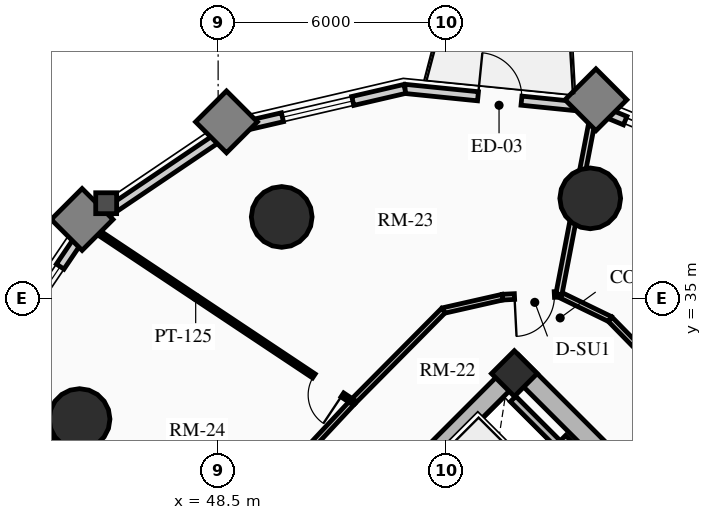
"""IFC4 building model, lengths in metres.
Left out: names, types, materials, properties, quantities, classifications, styles, units other than length and angle.
Written with IfcOpenShell. Run it as: python <this file> out.ifc"""

import sys

from ifc_helpers import new_model, si_unit, direction, frame, frame_2d, origin, origin_2d, place, context, subcontext, project, spatial, rectangle, circle, extrude, source, transform, mapped, element, fill, save


model = new_model("IFC4")
c1 = context("Model", 3, precision=1e-05, world=origin(), true_north=direction((0.0, 1.0)))
c2 = subcontext(c1, "Body", "Model", "MODEL_VIEW")
j1 = project(units=[si_unit("LENGTHUNIT", "METRE"), si_unit("PLANEANGLEUNIT", "RADIAN")], contexts=[c1])
p1 = place(None, origin())
s1 = spatial("IfcSite", under=j1, at=p1, CompositionType="ELEMENT")
p2 = place(p1, origin())
s2 = spatial("IfcBuilding", under=s1, at=p2, CompositionType="ELEMENT")
p3 = place(p2, frame((0.0, 0.0, 22.0)))
s3 = spatial("IfcBuildingStorey", under=s2, at=p3, CompositionType="ELEMENT", Elevation=22.0)
p4 = place(p3, frame((66.339, 23.227, 0.0), z_axis=(0.0, 0.0, 1.0), x_axis=(-0.707106781187, 0.707106781187, 0.0)))
e1 = element("IfcWall", 1, at=p4, inside=s3, PredefinedType="SHEAR", context=c2, shape_type="SweptSolid", body=[
    extrude(rectangle(XDim=14.3, YDim=0.5, at=frame_2d((7.15, 0.0))), origin(), (0.0, 0.0, 1.0), 2.91),
])
p5 = place(p3, frame((48.838, 25.596, 0.0), z_axis=(0.0, 0.0, 1.0), x_axis=(0.707106781187, 0.707106781187, 0.0)))
e2 = element("IfcWall", 2, at=p5, inside=s3, PredefinedType="SHEAR", context=c2, shape_type="SweptSolid", body=[
    extrude(rectangle(XDim=10.7, YDim=0.5, at=frame_2d((5.35, 0.0))), origin(), (0.0, 0.0, 1.0), 2.91),
])
m1 = source(origin(), c2, "Body", "SweptSolid", [
    extrude(rectangle(XDim=1.5, YDim=2.02, at=frame_2d((0.75, 1.01))), frame((0.0, 0.26, 0.0), z_axis=(0.0, -1.0, 0.0), x_axis=(1.0, 0.0, 0.0)), (0.0, 0.0, 1.0), 0.52),
])
p6 = place(p5, frame((4.6, 0.0, 0.0)))
e3 = element("IfcOpeningElement", 3, at=p6, cuts=e2, PredefinedType="OPENING", context=c2, shape_type="MappedRepresentation", body=[
    mapped(m1, transform((0.0, 0.0, 0.0), x_axis=(1.0, 0.0, 0.0), y_axis=(0.0, 1.0, 0.0), z_axis=(0.0, 0.0, 1.0), scale=1.0)),
])
p7 = place(p3, frame((56.294, 33.024, 0.0), z_axis=(0.0, 0.0, 1.0), x_axis=(0.707106781187, 0.707106781187, 0.0)))
e4 = element("IfcColumn", 4, at=p7, inside=s3, PredefinedType="COLUMN", context=c2, shape_type="SweptSolid", body=[
    extrude(rectangle(XDim=0.85, YDim=0.85, at=origin_2d()), origin(), (0.0, 0.0, 1.0), 2.91),
])
for number, where, z_axis, x_axis in (
    (5, (58.291, 37.635, 0.0), (0.0, 0.0, 1.0), (1.0, 0.0, 0.0)),
    (6, (50.173, 37.146, 0.0), (0.0, 0.0, 1.0), (1.0, 0.0, 0.0)),
    (7, (44.854, 31.827, 0.0), (0.0, 0.0, 1.0), (1.0, 0.0, 0.0)),
):
    element("IfcColumn", number, at=place(p3, frame(where, z_axis=z_axis, x_axis=x_axis)), inside=s3, PredefinedType="USERDEFINED", context=c2, shape_type="SweptSolid", body=[
        extrude(circle(Radius=0.8, at=origin_2d()), origin(), (0.0, 0.0, 1.0), 2.91),
    ])
p8 = place(p3, frame((58.407, 40.012, 0.0), z_axis=(0.0, 0.0, 1.0), x_axis=(0.924556017656, -0.381046152345, 0.0)))
e8 = element("IfcWall", 8, at=p8, inside=s3, PredefinedType="SOLIDWALL", context=c2, shape_type="SweptSolid", body=[
    extrude(rectangle(XDim=0.87, YDim=0.24, at=frame_2d((0.435, 0.0))), origin(), (0.0, 0.0, 1.0), 2.073),
])
p9 = place(p3, frame((53.414, 40.516, 0.0), z_axis=(0.0, 0.0, 1.0), x_axis=(0.994951574538, -0.100356187272, 0.0)))
e9 = element("IfcWall", 9, at=p9, inside=s3, PredefinedType="SOLIDWALL", context=c2, shape_type="SweptSolid", body=[
    extrude(rectangle(XDim=5.019, YDim=0.24, at=frame_2d((2.509, 0.0))), origin(), (0.0, 0.0, 1.0), 2.073),
])
m2 = source(origin(), c2, "Body", "SweptSolid", [
    extrude(rectangle(XDim=1.15, YDim=2.005, at=frame_2d((0.575, 1.002))), frame((0.0, 0.13, 0.0), z_axis=(0.0, -1.0, 0.0), x_axis=(1.0, 0.0, 0.0)), (0.0, 0.0, 1.0), 0.26),
])
p10 = place(p9, frame((1.934, 0.0, 0.0)))
e10 = element("IfcOpeningElement", 10, at=p10, cuts=e9, PredefinedType="OPENING", context=c2, shape_type="MappedRepresentation", body=[
    mapped(m2, transform((0.0, 0.0, 0.0), x_axis=(1.0, 0.0, 0.0), y_axis=(0.0, 1.0, 0.0), z_axis=(0.0, 0.0, 1.0), scale=1.0)),
])
p11 = place(p3, frame((48.82, 39.452, 0.0), z_axis=(0.0, 0.0, 1.0), x_axis=(0.974197104074, 0.225698919833, 0.0)))
e11 = element("IfcWall", 11, at=p11, inside=s3, PredefinedType="SOLIDWALL", context=c2, shape_type="SweptSolid", body=[
    extrude(rectangle(XDim=4.715, YDim=0.24, at=frame_2d((2.357, 0.0))), origin(), (0.0, 0.0, 1.0), 2.073),
])
m3 = source(origin(), c2, "Body", "SweptSolid", [
    extrude(rectangle(XDim=1.9, YDim=1.35, at=frame_2d((0.95, 0.675))), frame((0.0, 0.13, 0.0), z_axis=(0.0, -1.0, 0.0), x_axis=(1.0, 0.0, 0.0)), (0.0, 0.0, 1.0), 0.26),
])
p12 = place(p11, frame((1.408, 0.0, 0.65)))
e12 = element("IfcOpeningElement", 12, at=p12, cuts=e11, PredefinedType="OPENING", context=c2, shape_type="MappedRepresentation", body=[
    mapped(m3, transform((0.0, 0.0, 0.0), x_axis=(1.0, 0.0, 0.0), y_axis=(0.0, 1.0, 0.0), z_axis=(0.0, 0.0, 1.0), scale=1.0)),
])
p13 = place(p3, frame((45.076, 36.924, 0.0), z_axis=(0.0, 0.0, 1.0), x_axis=(0.828776615238, 0.559579594012, 0.0)))
e13 = element("IfcWall", 13, at=p13, inside=s3, PredefinedType="SOLIDWALL", context=c2, shape_type="SweptSolid", body=[
    extrude(rectangle(XDim=4.517, YDim=0.24, at=frame_2d((2.259, 0.0))), origin(), (0.0, 0.0, 1.0), 2.073),
])
p14 = place(p3, frame((42.548, 33.18, 0.0), z_axis=(0.0, 0.0, 1.0), x_axis=(0.559579594012, 0.828776615238, 0.0)))
e14 = element("IfcWall", 14, at=p14, inside=s3, PredefinedType="SOLIDWALL", context=c2, shape_type="SweptSolid", body=[
    extrude(rectangle(XDim=4.517, YDim=0.24, at=frame_2d((2.259, 0.0))), origin(), (0.0, 0.0, 1.0), 2.073),
])
p15 = place(p14, frame((1.309, 0.0, 0.65)))
e15 = element("IfcOpeningElement", 15, at=p15, cuts=e14, PredefinedType="OPENING", context=c2, shape_type="MappedRepresentation", body=[
    mapped(m3, transform((0.0, 0.0, 0.0), x_axis=(1.0, 0.0, 0.0), y_axis=(0.0, 1.0, 0.0), z_axis=(0.0, 0.0, 1.0), scale=1.0)),
])
p16 = place(p3, frame((55.615, 29.227, 0.0), z_axis=(0.0, 0.0, 1.0), x_axis=(0.707147878904, 0.70706568108, 0.0)))
e16 = element("IfcWall", 16, at=p16, inside=s3, PredefinedType="SHEAR", context=c2, shape_type="SweptSolid", body=[
    extrude(rectangle(XDim=2.97, YDim=0.2, at=frame_2d((1.485, 0.0))), origin(), (0.0, 0.0, 1.0), 2.91),
])
p17 = place(p3, frame((57.419, 31.2, 0.0), z_axis=(0.0, 0.0, 1.0), x_axis=(-0.707032117043, 0.707181437447, 0.0)))
e17 = element("IfcWall", 17, at=p17, inside=s3, PredefinedType="SHEAR", context=c2, shape_type="SweptSolid", body=[
    extrude(rectangle(XDim=1.635, YDim=0.2, at=frame_2d((0.817, 0.0))), origin(), (0.0, 0.0, 1.0), 2.91),
])
p18 = place(p3, frame((63.086, 30.086, 0.0), z_axis=(0.0, 0.0, 1.0), x_axis=(-0.699075897379, 0.715047473741, 0.0)))
e18 = element("IfcWall", 18, at=p18, inside=s3, PredefinedType="PARTITIONING", context=c2, shape_type="SweptSolid", body=[
    extrude(rectangle(XDim=6.114, YDim=0.15, at=frame_2d((3.057, 0.0))), origin(), (0.0, 0.0, 1.0), 2.159),
])
m4 = source(origin(), c2, "Body", "SweptSolid", [
    extrude(rectangle(XDim=1.05, YDim=2.015, at=frame_2d((0.525, 1.007))), frame((0.0, 0.085, 0.0), z_axis=(0.0, -1.0, 0.0), x_axis=(1.0, 0.0, 0.0)), (0.0, 0.0, 1.0), 0.17),
])
p19 = place(p18, frame((2.532, 0.0, 0.0)))
e19 = element("IfcOpeningElement", 19, at=p19, cuts=e18, PredefinedType="OPENING", context=c2, shape_type="MappedRepresentation", body=[
    mapped(m4, transform((0.0, 0.0, 0.0), x_axis=(1.0, 0.0, 0.0), y_axis=(0.0, 1.0, 0.0), z_axis=(0.0, 0.0, 1.0), scale=1.0)),
])
p20 = place(p3, frame((58.812, 34.458, 0.0), z_axis=(0.0, 0.0, 1.0), x_axis=(-0.899559490277, 0.436798264021, 0.0)))
e20 = element("IfcWall", 20, at=p20, inside=s3, PredefinedType="PARTITIONING", context=c2, shape_type="SweptSolid", body=[
    extrude(rectangle(XDim=1.495, YDim=0.15, at=frame_2d((0.748, 0.0))), origin(), (0.0, 0.0, 1.0), 2.205),
])
p21 = place(p3, frame((57.467, 35.111, 0.0), z_axis=(0.0, 0.0, 1.0), x_axis=(-0.998691757323, -0.051134859488, 0.0)))
e21 = element("IfcWall", 21, at=p21, inside=s3, PredefinedType="PARTITIONING", context=c2, shape_type="SweptSolid", body=[
    extrude(rectangle(XDim=1.485, YDim=0.15, at=frame_2d((0.742, 0.0))), origin(), (0.0, 0.0, 1.0), 2.159),
])
p22 = place(p21, frame((0.12, 0.0, 0.0)))
e22 = element("IfcOpeningElement", 22, at=p22, cuts=e21, PredefinedType="OPENING", context=c2, shape_type="MappedRepresentation", body=[
    mapped(m4, transform((0.0, 0.0, 0.0), x_axis=(1.0, 0.0, 0.0), y_axis=(0.0, 1.0, 0.0), z_axis=(0.0, 0.0, 1.0), scale=1.0)),
])
p23 = place(p3, frame((55.984, 35.035, 0.0), z_axis=(0.0, 0.0, 1.0), x_axis=(-0.975290305708, -0.22092718165, 0.0)))
e23 = element("IfcWall", 23, at=p23, inside=s3, PredefinedType="PARTITIONING", context=c2, shape_type="SweptSolid", body=[
    extrude(rectangle(XDim=1.597, YDim=0.15, at=frame_2d((0.798, 0.0))), origin(), (0.0, 0.0, 1.0), 2.205),
])
p24 = place(p3, frame((54.427, 34.683, 0.0), z_axis=(0.0, 0.0, 1.0), x_axis=(-0.704178989986, -0.710022499687, 0.0)))
e24 = element("IfcWall", 24, at=p24, inside=s3, PredefinedType="PARTITIONING", context=c2, shape_type="SweptSolid", body=[
    extrude(rectangle(XDim=3.384, YDim=0.15, at=frame_2d((1.692, 0.0))), origin(), (0.0, 0.0, 1.0), 2.159),
])
p25 = place(p3, frame((52.043, 32.28, 0.0), z_axis=(0.0, 0.0, 1.0), x_axis=(-0.682606081633, -0.730786519661, 0.0)))
e25 = element("IfcWall", 25, at=p25, inside=s3, PredefinedType="PARTITIONING", context=c2, shape_type="SweptSolid", body=[
    extrude(rectangle(XDim=6.527, YDim=0.15, at=frame_2d((3.263, 0.0))), origin(), (0.0, 0.0, 1.0), 2.159),
])
p26 = place(p3, frame((57.467, 35.111, 0.0), z_axis=(0.0, 0.0, 1.0), x_axis=(0.188572285328, 0.982059312468, 0.0)))
e26 = element("IfcWall", 26, at=p26, inside=s3, PredefinedType="PARTITIONING", context=c2, shape_type="SweptSolid", body=[
    extrude(rectangle(XDim=4.97, YDim=0.16, at=frame_2d((2.485, 0.0))), origin(), (0.0, 0.0, 1.0), 2.073),
])
p27 = place(p3, frame((47.588, 27.51, 0.0), z_axis=(0.0, 0.0, 1.0), x_axis=(-0.663646630644, 0.74804622159, 0.0)))
e27 = element("IfcWall", 27, at=p27, inside=s3, PredefinedType="MOVABLE", context=c2, shape_type="SweptSolid", body=[
    extrude(rectangle(XDim=7.567, YDim=0.1, at=frame_2d((3.784, 0.0))), origin(), (0.0, 0.0, 1.0), 2.073),
])
p28 = place(p3, frame((52.043, 32.28, 0.0), z_axis=(0.0, 0.0, 1.0), x_axis=(-0.832355916658, 0.554241488887, 0.0)))
e28 = element("IfcWall", 28, at=p28, inside=s3, PredefinedType="PARTITIONING", context=c2, shape_type="SweptSolid", body=[
    extrude(rectangle(XDim=8.354, YDim=0.125, at=frame_2d((4.177, 0.0))), origin(), (0.0, 0.0, 1.0), 2.073),
])
m5 = source(origin(), c2, "Body", "SweptSolid", [
    extrude(rectangle(XDim=0.9, YDim=2.005, at=frame_2d((0.45, 1.002))), frame((0.0, 0.073, 0.0), z_axis=(0.0, -1.0, 0.0), x_axis=(1.0, 0.0, 0.0)), (0.0, 0.0, 1.0), 0.145),
])
p29 = place(p28, frame((0.33, 0.0, 0.0)))
e29 = element("IfcOpeningElement", 29, at=p29, cuts=e28, PredefinedType="OPENING", context=c2, shape_type="MappedRepresentation", body=[
    mapped(m5, transform((0.0, 0.0, 0.0), x_axis=(1.0, 0.0, 0.0), y_axis=(0.0, 1.0, 0.0), z_axis=(0.0, 0.0, 1.0), scale=1.0)),
])
m6 = source(origin(), c2, "Body", "SweptSolid", [
    extrude(rectangle(XDim=1.15, YDim=2.005, at=frame_2d((0.575, 1.002))), frame((0.0, 0.025, 0.0), z_axis=(0.0, -1.0, 0.0), x_axis=(1.0, 0.0, 0.0)), (0.0, 0.0, 1.0), 0.05),
])
p30 = place(p10, origin())
e30 = element("IfcDoor", 30, at=p30, inside=s3, OperationType="SINGLE_SWING_LEFT", PredefinedType="DOOR", context=c2, shape_type="MappedRepresentation", body=[
    mapped(m6, transform((0.0, 0.0, 0.0), x_axis=(1.0, 0.0, 0.0), y_axis=(0.0, 1.0, 0.0), z_axis=(0.0, 0.0, 1.0), scale=1.0)),
])
fill(e10, e30)
m7 = source(origin(), c2, "Body", "SweptSolid", [
    extrude(rectangle(XDim=1.9, YDim=1.35, at=frame_2d((0.95, 0.675))), frame((0.0, 0.03, 0.0), z_axis=(0.0, -1.0, 0.0), x_axis=(1.0, 0.0, 0.0)), (0.0, 0.0, 1.0), 0.06),
])
p31 = place(p12, origin())
e31 = element("IfcWindow", 31, at=p31, inside=s3, PartitioningType="DOUBLE_PANEL_VERTICAL", PredefinedType="WINDOW", context=c2, shape_type="MappedRepresentation", body=[
    mapped(m7, transform((0.0, 0.0, 0.0), x_axis=(1.0, 0.0, 0.0), y_axis=(0.0, 1.0, 0.0), z_axis=(0.0, 0.0, 1.0), scale=1.0)),
])
fill(e12, e31)
p32 = place(p15, origin())
e32 = element("IfcWindow", 32, at=p32, inside=s3, PartitioningType="DOUBLE_PANEL_VERTICAL", PredefinedType="WINDOW", context=c2, shape_type="MappedRepresentation", body=[
    mapped(m7, transform((0.0, 0.0, 0.0), x_axis=(1.0, 0.0, 0.0), y_axis=(0.0, 1.0, 0.0), z_axis=(0.0, 0.0, 1.0), scale=1.0)),
])
fill(e15, e32)
m8 = source(origin(), c2, "Body", "SweptSolid", [
    extrude(rectangle(XDim=1.05, YDim=2.015, at=frame_2d((0.525, 1.007))), frame((0.0, 0.025, 0.0), z_axis=(0.0, -1.0, 0.0), x_axis=(1.0, 0.0, 0.0)), (0.0, 0.0, 1.0), 0.05),
])
p33 = place(p22, origin())
e33 = element("IfcDoor", 33, at=p33, inside=s3, OperationType="SINGLE_SWING_RIGHT", PredefinedType="DOOR", context=c2, shape_type="MappedRepresentation", body=[
    mapped(m8, transform((0.0, 0.0, 0.0), x_axis=(1.0, 0.0, 0.0), y_axis=(0.0, 1.0, 0.0), z_axis=(0.0, 0.0, 1.0), scale=1.0)),
])
fill(e22, e33)
m9 = source(origin(), c2, "Body", "SweptSolid", [
    extrude(rectangle(XDim=0.9, YDim=2.005, at=frame_2d((0.45, 1.002))), frame((0.0, 0.025, 0.0), z_axis=(0.0, -1.0, 0.0), x_axis=(1.0, 0.0, 0.0)), (0.0, 0.0, 1.0), 0.05),
])
p34 = place(p29, origin())
e34 = element("IfcDoor", 34, at=p34, inside=s3, OperationType="SINGLE_SWING_LEFT", PredefinedType="DOOR", context=c2, shape_type="MappedRepresentation", body=[
    mapped(m9, transform((0.0, 0.0, 0.0), x_axis=(1.0, 0.0, 0.0), y_axis=(0.0, 1.0, 0.0), z_axis=(0.0, 0.0, 1.0), scale=1.0)),
])
fill(e29, e34)
save(model, sys.argv[1])
